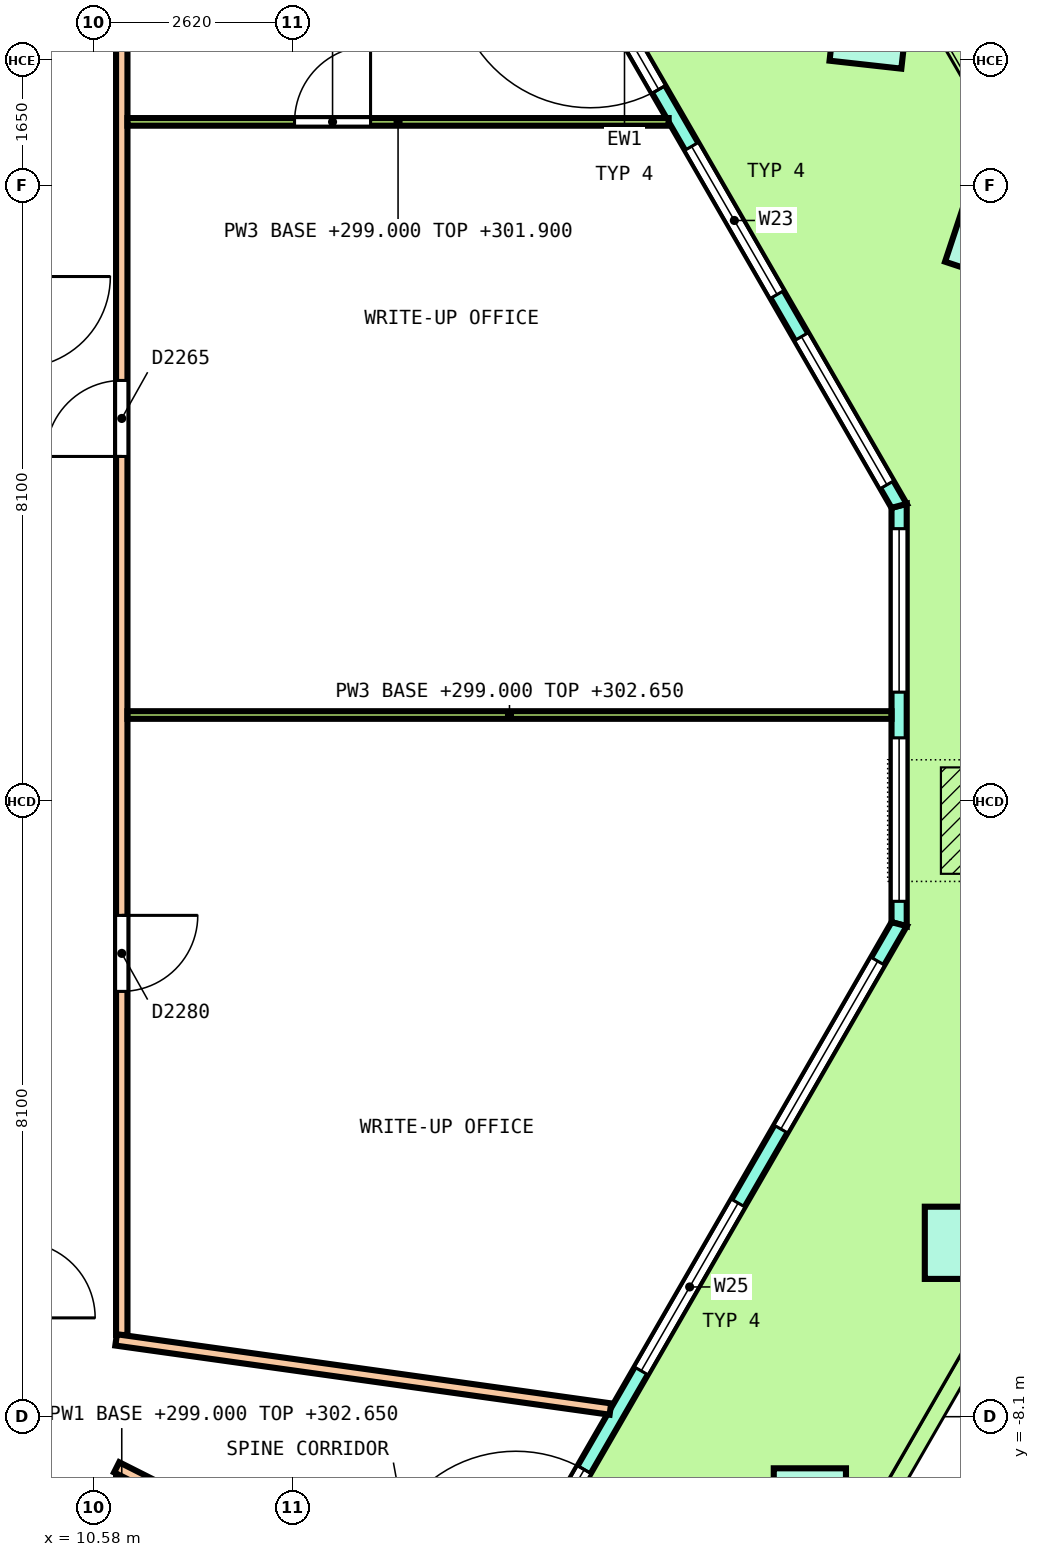
"""IFC4 building model, lengths in metres.
Left out: names, types, materials, properties, quantities, classifications, styles, units other than length and angle.
Written with IfcOpenShell. Run it as: python <this file> out.ifc"""

import sys

from ifc_helpers import new_model, si_unit, direction, frame, frame_2d, origin, origin_2d, place, context, subcontext, project, spatial, polyline, rectangle, outline, extrude, element, fill, save


model = new_model("IFC4")
c1 = context("Model", 3, precision=1e-05, world=origin(), true_north=direction((0.0, 1.0)))
c2 = subcontext(c1, "Body", "Model", "MODEL_VIEW")
j1 = project(units=[si_unit("LENGTHUNIT", "METRE"), si_unit("PLANEANGLEUNIT", "RADIAN")], contexts=[c1])
p1 = place(None, origin())
s1 = spatial("IfcSite", under=j1, at=p1, CompositionType="ELEMENT")
p2 = place(p1, origin())
s2 = spatial("IfcBuilding", under=s1, at=p2, CompositionType="ELEMENT")
p3 = place(p2, frame((0.0, 0.0, 299.0)))
s3 = spatial("IfcBuildingStorey", under=s2, at=p3, CompositionType="ELEMENT", Elevation=299.0)
p4 = place(p3, frame((22.382, 7.396, 0.0), z_axis=(-0.187758226885, -0.216738021658, 0.958003903022), x_axis=(-0.519767268221, 0.849519403482, 0.090325909867)))
e1 = element("IfcColumn", 1, at=p4, inside=s3, PredefinedType="COLUMN", context=c2, shape_type="SweptSolid", body=[
    extrude(rectangle(XDim=0.95, YDim=0.95, at=origin_2d()), origin(), (0.0, 0.0, 1.0), 3.8),
])
p5 = place(p3, frame((20.787, 10.159, 0.0), z_axis=(-0.219889345571, -0.163212191256, 0.961774639055), x_axis=(-0.5071044007, 0.861354244698, 0.030232299479)))
e2 = element("IfcColumn", 2, at=p5, inside=s3, PredefinedType="COLUMN", context=c2, shape_type="SweptSolid", body=[
    extrude(rectangle(XDim=0.95, YDim=0.95, at=origin_2d()), origin(), (0.0, 0.0, 1.0), 3.795),
])
p6 = place(p3, frame((20.003, -9.254, 0.0), z_axis=(-0.032528551975, -0.05642298213, 0.997876916455), x_axis=(0.498550874941, 0.864410415038, 0.065128023684)))
e3 = element("IfcColumn", 3, at=p6, inside=s3, PredefinedType="COLUMN", context=c2, shape_type="SweptSolid", body=[
    extrude(rectangle(XDim=0.95, YDim=0.95, at=origin_2d()), origin(), (0.0, 0.0, 1.0), 3.648),
])
p7 = place(p3, frame((21.99, -5.812, 0.0), z_axis=(-0.096165528476, -0.166528943905, 0.981335978131), x_axis=(0.490749060083, 0.849815075181, 0.192301060902)))
e4 = element("IfcColumn", 4, at=p7, inside=s3, PredefinedType="COLUMN", context=c2, shape_type="SweptSolid", body=[
    extrude(rectangle(XDim=0.95, YDim=0.95, at=origin_2d()), origin(), (0.0, 0.0, 1.0), 3.709),
])
p8 = place(p3, frame((21.177, -1.62, 0.0), z_axis=(0.0, 0.0, 1.0), x_axis=(0.0, 1.0, 0.0)))
e5 = element("IfcWall", 5, at=p8, inside=s3, PredefinedType="SOLIDWALL", context=c2, shape_type="SweptSolid", body=[
    extrude(outline(polyline([(-0.027, -0.1), (1.084, -0.1), (2.196, -0.1), (3.307, -0.1), (4.419, -0.1), (5.53, -0.1), (5.477, 0.1), (4.387, 0.1), (3.297, 0.1), (2.207, 0.1), (1.117, 0.1), (0.027, 0.1), (-0.027, -0.1)])), origin(), (0.0, 0.0, 1.0), 3.7),
])
p9 = place(p8, frame((0.301, 0.0, 0.1)))
e6 = element("IfcOpeningElement", 6, at=p9, cuts=e5, PredefinedType="OPENING", context=c2, shape_type="SweptSolid", body=[
    extrude(rectangle(XDim=2.15, YDim=2.75, at=frame_2d((1.075, 1.375))), frame((0.0, 0.11, 0.0), z_axis=(0.0, -1.0, 0.0), x_axis=(1.0, 0.0, 0.0)), (0.0, 0.0, 1.0), 0.22),
])
p10 = place(p8, frame((3.052, 0.0, 0.1)))
e7 = element("IfcOpeningElement", 7, at=p10, cuts=e5, PredefinedType="OPENING", context=c2, shape_type="SweptSolid", body=[
    extrude(rectangle(XDim=2.15, YDim=2.75, at=frame_2d((1.075, 1.375))), frame((0.0, 0.11, 0.0), z_axis=(0.0, -1.0, 0.0), x_axis=(1.0, 0.0, 0.0)), (0.0, 0.0, 1.0), 0.22),
])
p11 = place(p3, frame((21.177, 3.883, 0.0), z_axis=(0.0, 0.0, 1.0), x_axis=(-0.499998359168, 0.866026351117, 0.0)))
e8 = element("IfcWall", 8, at=p11, inside=s3, PredefinedType="SOLIDWALL", context=c2, shape_type="SweptSolid", body=[
    extrude(outline(polyline([(-0.027, -0.1), (1.009, -0.1), (2.045, -0.1), (3.081, -0.1), (4.117, -0.1), (5.154, -0.1), (6.189, -0.1), (7.226, -0.1), (8.262, -0.1), (9.298, -0.1), (10.334, -0.1), (11.37, -0.1), (12.406, -0.1), (13.442, -0.1), (14.478, -0.1), (14.424, 0.1), (13.396, 0.1), (12.367, 0.1), (11.339, 0.1), (10.311, 0.1), (9.282, 0.1), (8.254, 0.1), (7.226, 0.1), (6.197, 0.1), (5.169, 0.1), (4.14, 0.1), (3.112, 0.1), (2.084, 0.1), (1.055, 0.1), (0.027, 0.1), (-0.027, -0.1)])), origin(), (0.0, 0.0, 1.0), 3.7),
])
p12 = place(p11, frame((0.32, 0.0, 0.1)))
e9 = element("IfcOpeningElement", 9, at=p12, cuts=e8, PredefinedType="OPENING", context=c2, shape_type="SweptSolid", body=[
    extrude(rectangle(XDim=2.25, YDim=2.75, at=frame_2d((1.125, 1.375))), frame((0.0, 0.11, 0.0), z_axis=(0.0, -1.0, 0.0), x_axis=(1.0, 0.0, 0.0)), (0.0, 0.0, 1.0), 0.22),
])
p13 = place(p11, frame((3.21, 0.0, 0.1)))
e10 = element("IfcOpeningElement", 10, at=p13, cuts=e8, PredefinedType="OPENING", context=c2, shape_type="SweptSolid", body=[
    extrude(rectangle(XDim=2.25, YDim=2.75, at=frame_2d((1.125, 1.375))), frame((0.0, 0.11, 0.0), z_axis=(0.0, -1.0, 0.0), x_axis=(1.0, 0.0, 0.0)), (0.0, 0.0, 1.0), 0.22),
])
p14 = place(p11, frame((6.326, 0.0, 0.0)))
e11 = element("IfcOpeningElement", 11, at=p14, cuts=e8, PredefinedType="OPENING", context=c2, shape_type="SweptSolid", body=[
    extrude(rectangle(XDim=1.8, YDim=2.4, at=frame_2d((0.9, 1.2))), frame((0.0, 0.11, 0.0), z_axis=(0.0, -1.0, 0.0), x_axis=(1.0, 0.0, 0.0)), (0.0, 0.0, 1.0), 0.22),
])
p15 = place(p11, frame((6.326, 0.0, 2.55)))
e12 = element("IfcOpeningElement", 12, at=p15, cuts=e8, PredefinedType="OPENING", context=c2, shape_type="SweptSolid", body=[
    extrude(rectangle(XDim=1.8, YDim=0.3, at=frame_2d((0.9, 0.15))), frame((0.0, 0.11, 0.0), z_axis=(0.0, -1.0, 0.0), x_axis=(1.0, 0.0, 0.0)), (0.0, 0.0, 1.0), 0.22),
])
p16 = place(p11, frame((8.991, 0.0, 0.1)))
e13 = element("IfcOpeningElement", 13, at=p16, cuts=e8, PredefinedType="OPENING", context=c2, shape_type="SweptSolid", body=[
    extrude(rectangle(XDim=2.25, YDim=2.75, at=frame_2d((1.125, 1.375))), frame((0.0, 0.11, 0.0), z_axis=(0.0, -1.0, 0.0), x_axis=(1.0, 0.0, 0.0)), (0.0, 0.0, 1.0), 0.22),
])
p17 = place(p11, frame((11.881, 0.0, 0.1)))
e14 = element("IfcOpeningElement", 14, at=p17, cuts=e8, PredefinedType="OPENING", context=c2, shape_type="SweptSolid", body=[
    extrude(rectangle(XDim=2.25, YDim=2.75, at=frame_2d((1.125, 1.375))), frame((0.0, 0.11, 0.0), z_axis=(0.0, -1.0, 0.0), x_axis=(1.0, 0.0, 0.0)), (0.0, 0.0, 1.0), 0.22),
])
p18 = place(p3, frame((11.992, -17.53, 0.0), z_axis=(0.0, 0.0, 1.0), x_axis=(0.50000545275, 0.866022255615, 0.0)))
e15 = element("IfcWall", 15, at=p18, inside=s3, PredefinedType="SOLIDWALL", context=c2, shape_type="SweptSolid", body=[
    extrude(outline(polyline([(-0.027, -0.1), (0.997, -0.1), (2.02, -0.1), (3.044, -0.1), (4.067, -0.1), (5.091, -0.1), (6.115, -0.1), (7.138, -0.1), (8.162, -0.1), (9.185, -0.1), (10.209, -0.1), (11.232, -0.1), (12.256, -0.1), (13.279, -0.1), (14.303, -0.1), (15.327, -0.1), (16.35, -0.1), (17.374, -0.1), (18.397, -0.1), (18.344, 0.1), (17.326, 0.1), (16.308, 0.1), (15.291, 0.1), (14.273, 0.1), (13.256, 0.1), (12.238, 0.1), (11.22, 0.1), (10.203, 0.1), (9.185, 0.1), (8.167, 0.1), (7.15, 0.1), (6.132, 0.1), (5.115, 0.1), (4.097, 0.1), (3.08, 0.1), (2.062, 0.1), (1.044, 0.1), (0.027, 0.1), (-0.027, -0.1)])), origin(), (0.0, 0.0, 1.0), 3.7),
])
p19 = place(p18, frame((0.562, 0.0, 0.1)))
e16 = element("IfcOpeningElement", 16, at=p19, cuts=e15, PredefinedType="OPENING", context=c2, shape_type="SweptSolid", body=[
    extrude(rectangle(XDim=2.55, YDim=2.75, at=frame_2d((1.275, 1.375))), frame((0.0, 0.11, 0.0), z_axis=(0.0, -1.0, 0.0), x_axis=(1.0, 0.0, 0.0)), (0.0, 0.0, 1.0), 0.22),
])
p20 = place(p18, frame((4.236, 0.0, 0.1)))
e17 = element("IfcOpeningElement", 17, at=p20, cuts=e15, PredefinedType="OPENING", context=c2, shape_type="SweptSolid", body=[
    extrude(rectangle(XDim=2.55, YDim=2.75, at=frame_2d((1.275, 1.375))), frame((0.0, 0.11, 0.0), z_axis=(0.0, -1.0, 0.0), x_axis=(1.0, 0.0, 0.0)), (0.0, 0.0, 1.0), 0.22),
])
p21 = place(p18, frame((8.285, 0.0, 0.0)))
e18 = element("IfcOpeningElement", 18, at=p21, cuts=e15, PredefinedType="OPENING", context=c2, shape_type="SweptSolid", body=[
    extrude(rectangle(XDim=1.8, YDim=2.4, at=frame_2d((0.9, 1.2))), frame((0.0, 0.11, 0.0), z_axis=(0.0, -1.0, 0.0), x_axis=(1.0, 0.0, 0.0)), (0.0, 0.0, 1.0), 0.22),
])
p22 = place(p18, frame((8.285, 0.0, 2.55)))
e19 = element("IfcOpeningElement", 19, at=p22, cuts=e15, PredefinedType="OPENING", context=c2, shape_type="SweptSolid", body=[
    extrude(rectangle(XDim=1.8, YDim=0.3, at=frame_2d((0.9, 0.15))), frame((0.0, 0.11, 0.0), z_axis=(0.0, -1.0, 0.0), x_axis=(1.0, 0.0, 0.0)), (0.0, 0.0, 1.0), 0.22),
])
p23 = place(p18, frame((11.584, 0.0, 0.1)))
e20 = element("IfcOpeningElement", 20, at=p23, cuts=e15, PredefinedType="OPENING", context=c2, shape_type="SweptSolid", body=[
    extrude(rectangle(XDim=2.55, YDim=2.75, at=frame_2d((1.275, 1.375))), frame((0.0, 0.11, 0.0), z_axis=(0.0, -1.0, 0.0), x_axis=(1.0, 0.0, 0.0)), (0.0, 0.0, 1.0), 0.22),
])
p24 = place(p18, frame((15.258, 0.0, 0.1)))
e21 = element("IfcOpeningElement", 21, at=p24, cuts=e15, PredefinedType="OPENING", context=c2, shape_type="SweptSolid", body=[
    extrude(rectangle(XDim=2.55, YDim=2.75, at=frame_2d((1.275, 1.375))), frame((0.0, 0.11, 0.0), z_axis=(0.0, -1.0, 0.0), x_axis=(1.0, 0.0, 0.0)), (0.0, 0.0, 1.0), 0.22),
])
p25 = place(p3, frame((10.95, -9.975, 0.0), z_axis=(0.0, 0.0, 1.0), x_axis=(0.0, 1.0, 0.0)))
e22 = element("IfcWall", 22, at=p25, inside=s3, PredefinedType="PARTITIONING", context=c2, shape_type="SweptSolid", body=[
    extrude(rectangle(XDim=1.1, YDim=0.15, at=frame_2d((0.55, 0.0))), origin(), (0.0, 0.0, 1.0), 3.65),
])
p26 = place(p3, frame((10.95, -7.025, 0.0), z_axis=(0.0, 0.0, 1.0), x_axis=(0.0, 1.0, 0.0)))
e23 = element("IfcWall", 23, at=p26, inside=s3, PredefinedType="PARTITIONING", context=c2, shape_type="SweptSolid", body=[
    extrude(rectangle(XDim=17.0, YDim=0.15, at=frame_2d((8.5, 0.0))), origin(), (0.0, 0.0, 1.0), 2.9),
])
p27 = place(p26, frame((11.558, 0.0, 0.0)))
e24 = element("IfcOpeningElement", 24, at=p27, cuts=e23, PredefinedType="OPENING", context=c2, shape_type="SweptSolid", body=[
    extrude(rectangle(XDim=1.0, YDim=2.1, at=frame_2d((0.5, 1.05))), frame((0.0, 0.085, 0.0), z_axis=(0.0, -1.0, 0.0), x_axis=(1.0, 0.0, 0.0)), (0.0, 0.0, 1.0), 0.17),
])
p28 = place(p26, frame((4.521, 0.0, 0.0)))
e25 = element("IfcOpeningElement", 25, at=p28, cuts=e23, PredefinedType="OPENING", context=c2, shape_type="SweptSolid", body=[
    extrude(rectangle(XDim=1.0, YDim=2.1, at=frame_2d((0.5, 1.05))), frame((0.0, 0.085, 0.0), z_axis=(0.0, -1.0, 0.0), x_axis=(1.0, 0.0, 0.0)), (0.0, 0.0, 1.0), 0.17),
])
p29 = place(p3, frame((10.883, -8.766, 0.0), z_axis=(0.0, 0.0, 1.0), x_axis=(0.892868658508, -0.450317175615, 0.0)))
e26 = element("IfcWall", 26, at=p29, inside=s3, PredefinedType="PARTITIONING", context=c2, shape_type="SweptSolid", body=[
    extrude(rectangle(XDim=5.25, YDim=0.15, at=frame_2d((2.625, 0.0))), origin(), (0.0, 0.0, 1.0), 3.65),
])
p30 = place(p29, frame((2.684, 0.0, 0.0)))
e27 = element("IfcOpeningElement", 27, at=p30, cuts=e26, PredefinedType="OPENING", context=c2, shape_type="SweptSolid", body=[
    extrude(rectangle(XDim=1.0, YDim=2.1, at=frame_2d((0.5, 1.05))), frame((0.0, 0.085, 0.0), z_axis=(0.0, -1.0, 0.0), x_axis=(1.0, 0.0, 0.0)), (0.0, 0.0, 1.0), 0.17),
])
p31 = place(p3, frame((10.876, -7.09, 0.0), z_axis=(0.0, 0.0, 1.0), x_axis=(0.990351444624, -0.138578555814, 0.0)))
e28 = element("IfcWall", 28, at=p31, inside=s3, PredefinedType="PARTITIONING", context=c2, shape_type="SweptSolid", body=[
    extrude(rectangle(XDim=6.566, YDim=0.15, at=frame_2d((3.283, 0.0))), origin(), (0.0, 0.0, 1.0), 2.9),
])
p32 = place(p3, frame((11.025, 8.935, 0.0), z_axis=(0.0, 0.0, 1.0), x_axis=(1.0, 0.0, 0.0)))
e29 = element("IfcWall", 29, at=p32, inside=s3, PredefinedType="PARTITIONING", context=c2, shape_type="SweptSolid", body=[
    extrude(rectangle(XDim=7.12, YDim=0.1, at=frame_2d((3.56, 0.0))), origin(), (0.0, 0.0, 1.0), 2.9),
])
p33 = place(p32, frame((2.198, 0.0, 0.0)))
e30 = element("IfcOpeningElement", 30, at=p33, cuts=e29, PredefinedType="OPENING", context=c2, shape_type="SweptSolid", body=[
    extrude(rectangle(XDim=1.0, YDim=2.1, at=frame_2d((0.5, 1.05))), frame((0.0, 0.06, 0.0), z_axis=(0.0, -1.0, 0.0), x_axis=(1.0, 0.0, 0.0)), (0.0, 0.0, 1.0), 0.12),
])
p34 = place(p3, frame((11.025, 1.131, 0.0), z_axis=(0.0, 0.0, 1.0), x_axis=(1.0, 0.0, 0.0)))
e31 = element("IfcWall", 31, at=p34, inside=s3, PredefinedType="PARTITIONING", context=c2, shape_type="SweptSolid", body=[
    extrude(rectangle(XDim=10.052, YDim=0.1, at=frame_2d((5.026, 0.0))), origin(), (0.0, 0.0, 1.0), 3.65),
])
p35 = place(p9, origin())
e32 = element("IfcWindow", 32, at=p35, inside=s3, PartitioningType="SINGLE_PANEL", PredefinedType="WINDOW", context=c2, shape_type="SweptSolid", body=[
    extrude(rectangle(XDim=2.15, YDim=2.75, at=frame_2d((1.075, 1.375))), frame((0.0, 0.03, 0.0), z_axis=(0.0, -1.0, 0.0), x_axis=(1.0, 0.0, 0.0)), (0.0, 0.0, 1.0), 0.06),
])
fill(e6, e32)
p36 = place(p10, origin())
e33 = element("IfcWindow", 33, at=p36, inside=s3, PartitioningType="SINGLE_PANEL", PredefinedType="WINDOW", context=c2, shape_type="SweptSolid", body=[
    extrude(rectangle(XDim=2.15, YDim=2.75, at=frame_2d((1.075, 1.375))), frame((0.0, 0.03, 0.0), z_axis=(0.0, -1.0, 0.0), x_axis=(1.0, 0.0, 0.0)), (0.0, 0.0, 1.0), 0.06),
])
fill(e7, e33)
p37 = place(p12, origin())
e34 = element("IfcWindow", 34, at=p37, inside=s3, PartitioningType="SINGLE_PANEL", PredefinedType="WINDOW", context=c2, shape_type="SweptSolid", body=[
    extrude(rectangle(XDim=2.25, YDim=2.75, at=frame_2d((1.125, 1.375))), frame((0.0, 0.03, 0.0), z_axis=(0.0, -1.0, 0.0), x_axis=(1.0, 0.0, 0.0)), (0.0, 0.0, 1.0), 0.06),
])
fill(e9, e34)
p38 = place(p13, origin())
e35 = element("IfcWindow", 35, at=p38, inside=s3, PartitioningType="SINGLE_PANEL", PredefinedType="WINDOW", context=c2, shape_type="SweptSolid", body=[
    extrude(rectangle(XDim=2.25, YDim=2.75, at=frame_2d((1.125, 1.375))), frame((0.0, 0.03, 0.0), z_axis=(0.0, -1.0, 0.0), x_axis=(1.0, 0.0, 0.0)), (0.0, 0.0, 1.0), 0.06),
])
fill(e10, e35)
p39 = place(p14, origin())
e36 = element("IfcDoor", 36, at=p39, inside=s3, OperationType="DOUBLE_DOOR_SINGLE_SWING", PredefinedType="DOOR", context=c2, shape_type="SweptSolid", body=[
    extrude(rectangle(XDim=1.8, YDim=2.4, at=frame_2d((0.9, 1.2))), frame((0.0, 0.025, 0.0), z_axis=(0.0, -1.0, 0.0), x_axis=(1.0, 0.0, 0.0)), (0.0, 0.0, 1.0), 0.05),
])
fill(e11, e36)
p40 = place(p15, origin())
e37 = element("IfcWindow", 37, at=p40, inside=s3, PartitioningType="SINGLE_PANEL", PredefinedType="WINDOW", context=c2, shape_type="SweptSolid", body=[
    extrude(rectangle(XDim=1.8, YDim=0.3, at=frame_2d((0.9, 0.15))), frame((0.0, 0.03, 0.0), z_axis=(0.0, -1.0, 0.0), x_axis=(1.0, 0.0, 0.0)), (0.0, 0.0, 1.0), 0.06),
])
fill(e12, e37)
p41 = place(p21, origin())
e38 = element("IfcDoor", 38, at=p41, inside=s3, OperationType="DOUBLE_DOOR_SINGLE_SWING", PredefinedType="DOOR", context=c2, shape_type="SweptSolid", body=[
    extrude(rectangle(XDim=1.8, YDim=2.4, at=frame_2d((0.9, 1.2))), frame((0.0, 0.025, 0.0), z_axis=(0.0, -1.0, 0.0), x_axis=(1.0, 0.0, 0.0)), (0.0, 0.0, 1.0), 0.05),
])
fill(e18, e38)
p42 = place(p22, origin())
e39 = element("IfcWindow", 39, at=p42, inside=s3, PartitioningType="SINGLE_PANEL", PredefinedType="WINDOW", context=c2, shape_type="SweptSolid", body=[
    extrude(rectangle(XDim=1.8, YDim=0.3, at=frame_2d((0.9, 0.15))), frame((0.0, 0.03, 0.0), z_axis=(0.0, -1.0, 0.0), x_axis=(1.0, 0.0, 0.0)), (0.0, 0.0, 1.0), 0.06),
])
fill(e19, e39)
p43 = place(p23, origin())
e40 = element("IfcWindow", 40, at=p43, inside=s3, PartitioningType="SINGLE_PANEL", PredefinedType="WINDOW", context=c2, shape_type="SweptSolid", body=[
    extrude(rectangle(XDim=2.55, YDim=2.75, at=frame_2d((1.275, 1.375))), frame((0.0, 0.03, 0.0), z_axis=(0.0, -1.0, 0.0), x_axis=(1.0, 0.0, 0.0)), (0.0, 0.0, 1.0), 0.06),
])
fill(e20, e40)
p44 = place(p24, origin())
e41 = element("IfcWindow", 41, at=p44, inside=s3, PartitioningType="SINGLE_PANEL", PredefinedType="WINDOW", context=c2, shape_type="SweptSolid", body=[
    extrude(rectangle(XDim=2.55, YDim=2.75, at=frame_2d((1.275, 1.375))), frame((0.0, 0.03, 0.0), z_axis=(0.0, -1.0, 0.0), x_axis=(1.0, 0.0, 0.0)), (0.0, 0.0, 1.0), 0.06),
])
fill(e21, e41)
p45 = place(p27, origin())
e42 = element("IfcDoor", 42, at=p45, inside=s3, OperationType="SINGLE_SWING_LEFT", PredefinedType="DOOR", context=c2, shape_type="SweptSolid", body=[
    extrude(rectangle(XDim=1.0, YDim=2.1, at=frame_2d((0.5, 1.05))), frame((0.0, 0.025, 0.0), z_axis=(0.0, -1.0, 0.0), x_axis=(1.0, 0.0, 0.0)), (0.0, 0.0, 1.0), 0.05),
])
fill(e24, e42)
p46 = place(p33, origin())
e43 = element("IfcDoor", 43, at=p46, inside=s3, OperationType="SINGLE_SWING_LEFT", PredefinedType="DOOR", context=c2, shape_type="SweptSolid", body=[
    extrude(rectangle(XDim=1.0, YDim=2.1, at=frame_2d((0.5, 1.05))), frame((0.0, 0.025, 0.0), z_axis=(0.0, -1.0, 0.0), x_axis=(1.0, 0.0, 0.0)), (0.0, 0.0, 1.0), 0.05),
])
fill(e30, e43)
p47 = place(p28, origin())
e44 = element("IfcDoor", 44, at=p47, inside=s3, OperationType="SINGLE_SWING_LEFT", PredefinedType="DOOR", context=c2, shape_type="SweptSolid", body=[
    extrude(rectangle(XDim=1.0, YDim=2.1, at=frame_2d((0.5, 1.05))), frame((0.0, 0.025, 0.0), z_axis=(0.0, -1.0, 0.0), x_axis=(1.0, 0.0, 0.0)), (0.0, 0.0, 1.0), 0.05),
])
fill(e25, e44)
save(model, sys.argv[1])
